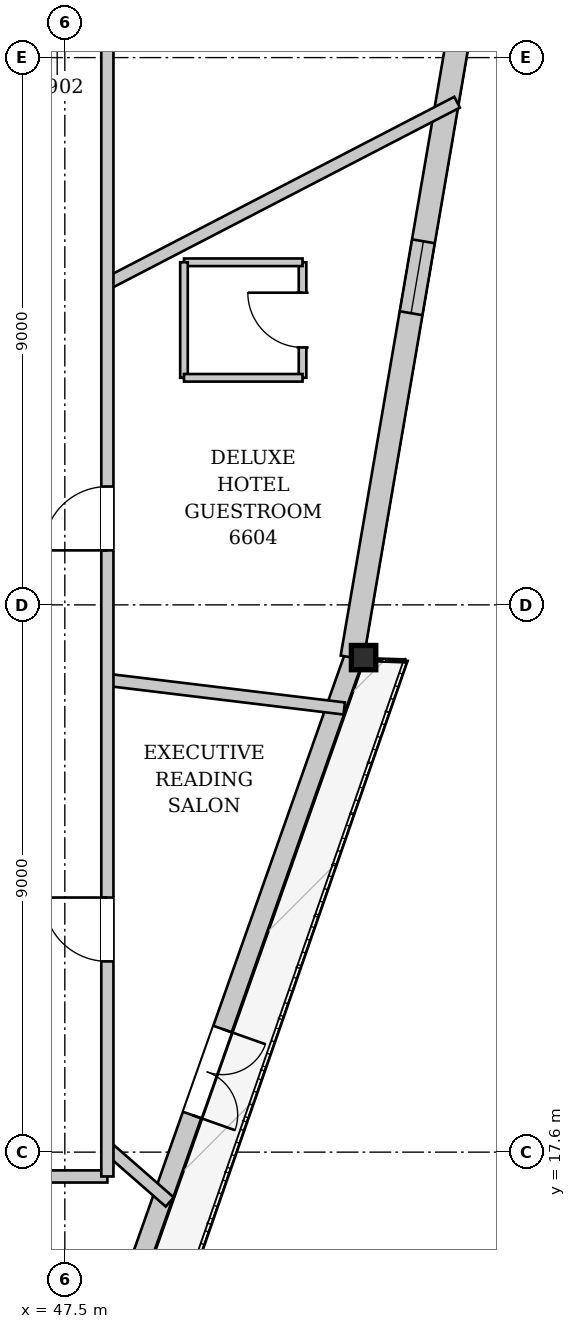
"""IFC4 building model, lengths in metres.
Left out: names, types, materials, properties, quantities, classifications, styles, units other than length and angle.
Written with IfcOpenShell. Run it as: python <this file> out.ifc"""

import sys

from ifc_helpers import new_model, si_unit, direction, frame, frame_2d, origin, origin_2d, place, context, subcontext, project, spatial, rectangle, i_section, extrude, source, transform, mapped, element, fill, save


model = new_model("IFC4")
c1 = context("Model", 3, precision=1e-05, world=origin(), true_north=direction((0.0, 1.0)))
c2 = subcontext(c1, "Body", "Model", "MODEL_VIEW")
j1 = project(units=[si_unit("LENGTHUNIT", "METRE"), si_unit("PLANEANGLEUNIT", "RADIAN")], contexts=[c1])
p1 = place(None, origin())
s1 = spatial("IfcSite", under=j1, at=p1, CompositionType="ELEMENT")
p2 = place(p1, origin())
s2 = spatial("IfcBuilding", under=s1, at=p2, CompositionType="ELEMENT")
p3 = place(p2, frame((0.0, 0.0, 248.9)))
s3 = spatial("IfcBuildingStorey", under=s2, at=p3, CompositionType="ELEMENT", Elevation=248.9)
m1 = source(origin(), c2, "Body", "SweptSolid", [
    extrude(i_section(OverallWidth=0.401, OverallDepth=0.399, WebThickness=0.022, FlangeThickness=0.034, at=origin_2d()), origin(), (0.0, 0.0, 1.0), 3.436),
])
p4 = place(p3, frame((52.412, 25.701, 0.0), z_axis=(0.001065918288, 0.018333794545, 0.999831353677), x_axis=(-0.998314169879, 0.058041521505, 0.0)))
e1 = element("IfcColumn", 1, at=p4, inside=s3, PredefinedType="COLUMN", context=c2, shape_type="MappedRepresentation", body=[
    mapped(m1, transform((0.0, 0.0, 0.0), x_axis=(1.0, 0.0, 0.0), y_axis=(0.0, 1.0, 0.0), z_axis=(0.0, 0.0, 1.0), scale=1.0)),
])
p5 = place(p3, frame((52.261, 25.755, 0.0), z_axis=(0.0, 0.0, 1.0), x_axis=(-0.333397626213, -0.94278630815, 0.0)))
e2 = element("IfcWall", 2, at=p5, inside=s3, PredefinedType="SOLIDWALL", context=c2, shape_type="SweptSolid", body=[
    extrude(rectangle(XDim=22.663, YDim=0.32, at=frame_2d((11.332, 0.0))), origin(), (0.0, 0.0, 1.0), 2.872),
])
p6 = place(p5, frame((6.502, 0.0, 0.0)))
e3 = element("IfcOpeningElement", 3, at=p6, cuts=e2, PredefinedType="OPENING", context=c2, shape_type="SweptSolid", body=[
    extrude(rectangle(XDim=1.5, YDim=2.3, at=frame_2d((0.75, 1.15))), frame((0.0, 0.17, 0.0), z_axis=(0.0, -1.0, 0.0), x_axis=(1.0, 0.0, 0.0)), (0.0, 0.0, 1.0), 0.34),
])
p7 = place(p5, frame((15.471, 0.0, 0.402)))
e4 = element("IfcOpeningElement", 4, at=p7, cuts=e2, PredefinedType="OPENING", context=c2, shape_type="SweptSolid", body=[
    extrude(rectangle(XDim=2.6, YDim=2.35, at=frame_2d((1.3, 1.175))), frame((0.0, 0.17, 0.0), z_axis=(0.0, -1.0, 0.0), x_axis=(1.0, 0.0, 0.0)), (0.0, 0.0, 1.0), 0.34),
])
p8 = place(p3, frame((56.053, 48.071, 0.0), z_axis=(0.0, 0.0, 1.0), x_axis=(-0.168923450159, -0.985629173668, 0.0)))
e5 = element("IfcWall", 5, at=p8, inside=s3, PredefinedType="SOLIDWALL", context=c2, shape_type="SweptSolid", body=[
    extrude(rectangle(XDim=22.663, YDim=0.38, at=frame_2d((11.332, 0.0))), origin(), (0.0, 0.0, 1.0), 2.872),
])
p9 = place(p8, frame((5.746, 0.0, 0.65)))
e6 = element("IfcOpeningElement", 6, at=p9, cuts=e5, PredefinedType="OPENING", context=c2, shape_type="SweptSolid", body=[
    extrude(rectangle(XDim=1.2, YDim=1.5, at=frame_2d((0.6, 0.75))), frame((0.0, 0.2, 0.0), z_axis=(0.0, -1.0, 0.0), x_axis=(1.0, 0.0, 0.0)), (0.0, 0.0, 1.0), 0.4),
])
p10 = place(p8, frame((15.718, 0.0, 0.65)))
e7 = element("IfcOpeningElement", 7, at=p10, cuts=e5, PredefinedType="OPENING", context=c2, shape_type="SweptSolid", body=[
    extrude(rectangle(XDim=1.2, YDim=1.5, at=frame_2d((0.6, 0.75))), frame((0.0, 0.2, 0.0), z_axis=(0.0, -1.0, 0.0), x_axis=(1.0, 0.0, 0.0)), (0.0, 0.0, 1.0), 0.4),
])
p11 = place(p3, frame((48.2, 17.677, 0.0), z_axis=(0.0, 0.0, 1.0), x_axis=(0.752676622661, -0.658390387005, 0.0)))
e8 = element("IfcWall", 8, at=p11, inside=s3, PredefinedType="PARTITIONING", context=c2, shape_type="SweptSolid", body=[
    extrude(rectangle(XDim=1.362, YDim=0.2, at=frame_2d((0.681, 0.0))), origin(), (0.0, 0.0, 1.0), 3.38),
])
p12 = place(p3, frame((48.2, 25.367, 0.0), z_axis=(0.0, 0.0, 1.0), x_axis=(0.992770450303, -0.120028467479, 0.0)))
e9 = element("IfcWall", 9, at=p12, inside=s3, PredefinedType="PARTITIONING", context=c2, shape_type="SweptSolid", body=[
    extrude(rectangle(XDim=3.924, YDim=0.2, at=frame_2d((1.962, 0.0))), origin(), (0.0, 0.0, 1.0), 3.38),
])
p13 = place(p3, frame((48.2, 31.885, 0.0), z_axis=(0.0, 0.0, 1.0), x_axis=(0.887874845761, 0.460085055468, 0.0)))
e10 = element("IfcWall", 10, at=p13, inside=s3, PredefinedType="PARTITIONING", context=c2, shape_type="SweptSolid", body=[
    extrude(rectangle(XDim=6.479, YDim=0.2, at=frame_2d((3.239, 0.0))), origin(), (0.0, 0.0, 1.0), 3.38),
])
p14 = place(p3, frame((42.069, 34.15, 0.0), z_axis=(0.0, 0.0, 1.0), x_axis=(0.474411767959, 0.880303058283, 0.0)))
e11 = element("IfcWall", 11, at=p14, inside=s3, PredefinedType="PARTITIONING", context=c2, shape_type="SweptSolid", body=[
    extrude(rectangle(XDim=14.84, YDim=0.2, at=frame_2d((7.42, 0.0))), origin(), (0.0, 0.0, 1.0), 3.38),
])
p15 = place(p3, frame((51.41, 30.334, 0.0), z_axis=(0.0, 0.0, 1.0), x_axis=(0.0, 1.0, 0.0)))
e12 = element("IfcWall", 12, at=p15, inside=s3, PredefinedType="PARTITIONING", context=c2, shape_type="SweptSolid", body=[
    extrude(rectangle(XDim=1.9, YDim=0.125, at=frame_2d((0.95, 0.0))), origin(), (0.0, 0.0, 1.0), 3.38),
])
p16 = place(p15, frame((0.5, 0.0, 0.0)))
e13 = element("IfcOpeningElement", 13, at=p16, cuts=e12, PredefinedType="OPENING", context=c2, shape_type="SweptSolid", body=[
    extrude(rectangle(XDim=0.9, YDim=2.1, at=frame_2d((0.45, 1.05))), frame((0.0, 0.073, 0.0), z_axis=(0.0, -1.0, 0.0), x_axis=(1.0, 0.0, 0.0)), (0.0, 0.0, 1.0), 0.145),
])
p17 = place(p3, frame((51.41, 32.234, 0.0), z_axis=(0.0, 0.0, 1.0), x_axis=(-1.0, 0.0, 0.0)))
e14 = element("IfcWall", 14, at=p17, inside=s3, PredefinedType="PARTITIONING", context=c2, shape_type="SweptSolid", body=[
    extrude(rectangle(XDim=1.95, YDim=0.125, at=frame_2d((0.975, 0.0))), origin(), (0.0, 0.0, 1.0), 3.38),
])
p18 = place(p3, frame((49.46, 32.234, 0.0), z_axis=(0.0, 0.0, 1.0), x_axis=(0.0, -1.0, 0.0)))
e15 = element("IfcWall", 15, at=p18, inside=s3, PredefinedType="PARTITIONING", context=c2, shape_type="SweptSolid", body=[
    extrude(rectangle(XDim=1.9, YDim=0.125, at=frame_2d((0.95, 0.0))), origin(), (0.0, 0.0, 1.0), 3.38),
])
p19 = place(p3, frame((49.46, 30.334, 0.0), z_axis=(0.0, 0.0, 1.0), x_axis=(1.0, 0.0, 0.0)))
e16 = element("IfcWall", 16, at=p19, inside=s3, PredefinedType="PARTITIONING", context=c2, shape_type="SweptSolid", body=[
    extrude(rectangle(XDim=1.95, YDim=0.125, at=frame_2d((0.975, 0.0))), origin(), (0.0, 0.0, 1.0), 3.38),
])
p20 = place(p3, frame((27.8, 17.2, 0.0), z_axis=(0.0, 0.0, 1.0), x_axis=(1.0, 0.0, 0.0)))
e17 = element("IfcWall", 17, at=p20, inside=s3, PredefinedType="PARTITIONING", context=c2, shape_type="SweptSolid", body=[
    extrude(rectangle(XDim=20.4, YDim=0.2, at=frame_2d((10.2, 0.0))), origin(), (0.0, 0.0, 1.0), 3.38),
])
p21 = place(p20, frame((9.291, 0.0, 0.0)))
e18 = element("IfcOpeningElement", 18, at=p21, cuts=e17, PredefinedType="OPENING", context=c2, shape_type="SweptSolid", body=[
    extrude(rectangle(XDim=1.05, YDim=2.2, at=frame_2d((0.525, 1.1))), frame((0.0, 0.11, 0.0), z_axis=(0.0, -1.0, 0.0), x_axis=(1.0, 0.0, 0.0)), (0.0, 0.0, 1.0), 0.22),
])
p22 = place(p20, frame((17.616, 0.0, 0.0)))
e19 = element("IfcOpeningElement", 19, at=p22, cuts=e17, PredefinedType="OPENING", context=c2, shape_type="SweptSolid", body=[
    extrude(rectangle(XDim=1.05, YDim=2.2, at=frame_2d((0.525, 1.1))), frame((0.0, 0.11, 0.0), z_axis=(0.0, -1.0, 0.0), x_axis=(1.0, 0.0, 0.0)), (0.0, 0.0, 1.0), 0.22),
])
p23 = place(p20, frame((0.361, 0.0, 0.0)))
e20 = element("IfcOpeningElement", 20, at=p23, cuts=e17, PredefinedType="OPENING", context=c2, shape_type="SweptSolid", body=[
    extrude(rectangle(XDim=1.05, YDim=2.2, at=frame_2d((0.525, 1.1))), frame((0.0, 0.11, 0.0), z_axis=(0.0, -1.0, 0.0), x_axis=(1.0, 0.0, 0.0)), (0.0, 0.0, 1.0), 0.22),
])
p24 = place(p3, frame((48.2, 17.2, 0.0), z_axis=(0.0, 0.0, 1.0), x_axis=(0.0, 1.0, 0.0)))
e21 = element("IfcWall", 21, at=p24, inside=s3, PredefinedType="PARTITIONING", context=c2, shape_type="SweptSolid", body=[
    extrude(rectangle(XDim=18.8, YDim=0.2, at=frame_2d((9.4, 0.0))), origin(), (0.0, 0.0, 1.0), 3.065),
])
p25 = place(p24, frame((3.537, 0.0, 0.0)))
e22 = element("IfcOpeningElement", 22, at=p25, cuts=e21, PredefinedType="OPENING", context=c2, shape_type="SweptSolid", body=[
    extrude(rectangle(XDim=1.05, YDim=2.2, at=frame_2d((0.525, 1.1))), frame((0.0, 0.11, 0.0), z_axis=(0.0, -1.0, 0.0), x_axis=(1.0, 0.0, 0.0)), (0.0, 0.0, 1.0), 0.22),
])
p26 = place(p24, frame((10.296, 0.0, 0.0)))
e23 = element("IfcOpeningElement", 23, at=p26, cuts=e21, PredefinedType="OPENING", context=c2, shape_type="SweptSolid", body=[
    extrude(rectangle(XDim=1.05, YDim=2.2, at=frame_2d((0.525, 1.1))), frame((0.0, 0.11, 0.0), z_axis=(0.0, -1.0, 0.0), x_axis=(1.0, 0.0, 0.0)), (0.0, 0.0, 1.0), 0.22),
])
m2 = source(origin(), c2, "Body", "SweptSolid", [
    extrude(rectangle(XDim=1.5, YDim=2.3, at=frame_2d((0.75, 1.15))), frame((0.0, 0.025, 0.0), z_axis=(0.0, -1.0, 0.0), x_axis=(1.0, 0.0, 0.0)), (0.0, 0.0, 1.0), 0.05),
])
p27 = place(p6, origin())
e24 = element("IfcDoor", 24, at=p27, inside=s3, OperationType="DOUBLE_DOOR_SINGLE_SWING", PredefinedType="DOOR", context=c2, shape_type="MappedRepresentation", body=[
    mapped(m2, transform((0.0, 0.0, 0.0), x_axis=(1.0, 0.0, 0.0), y_axis=(0.0, 1.0, 0.0), z_axis=(0.0, 0.0, 1.0), scale=1.0)),
])
fill(e3, e24)
m3 = source(origin(), c2, "Body", "SweptSolid", [
    extrude(rectangle(XDim=1.2, YDim=1.5, at=frame_2d((0.6, 0.75))), frame((0.0, 0.03, 0.0), z_axis=(0.0, -1.0, 0.0), x_axis=(1.0, 0.0, 0.0)), (0.0, 0.0, 1.0), 0.06),
])
p28 = place(p10, origin())
e25 = element("IfcWindow", 25, at=p28, inside=s3, PartitioningType="SINGLE_PANEL", PredefinedType="WINDOW", context=c2, shape_type="MappedRepresentation", body=[
    mapped(m3, transform((0.0, 0.0, 0.0), x_axis=(1.0, 0.0, 0.0), y_axis=(0.0, 1.0, 0.0), z_axis=(0.0, 0.0, 1.0), scale=1.0)),
])
fill(e7, e25)
m4 = source(origin(), c2, "Body", "SweptSolid", [
    extrude(rectangle(XDim=0.9, YDim=2.1, at=frame_2d((0.45, 1.05))), frame((0.0, 0.025, 0.0), z_axis=(0.0, -1.0, 0.0), x_axis=(1.0, 0.0, 0.0)), (0.0, 0.0, 1.0), 0.05),
])
p29 = place(p16, origin())
e26 = element("IfcDoor", 26, at=p29, inside=s3, OperationType="SINGLE_SWING_RIGHT", PredefinedType="DOOR", context=c2, shape_type="MappedRepresentation", body=[
    mapped(m4, transform((0.0, 0.0, 0.0), x_axis=(1.0, 0.0, 0.0), y_axis=(0.0, 1.0, 0.0), z_axis=(0.0, 0.0, 1.0), scale=1.0)),
])
fill(e13, e26)
m5 = source(origin(), c2, "Body", "SweptSolid", [
    extrude(rectangle(XDim=1.05, YDim=2.2, at=frame_2d((0.525, 1.1))), frame((0.0, 0.025, 0.0), z_axis=(0.0, -1.0, 0.0), x_axis=(1.0, 0.0, 0.0)), (0.0, 0.0, 1.0), 0.05),
])
p30 = place(p25, origin())
e27 = element("IfcDoor", 27, at=p30, inside=s3, OperationType="SINGLE_SWING_RIGHT", PredefinedType="DOOR", context=c2, shape_type="MappedRepresentation", body=[
    mapped(m5, transform((0.0, 0.0, 0.0), x_axis=(1.0, 0.0, 0.0), y_axis=(0.0, 1.0, 0.0), z_axis=(0.0, 0.0, 1.0), scale=1.0)),
])
fill(e22, e27)
p31 = place(p26, origin())
e28 = element("IfcDoor", 28, at=p31, inside=s3, OperationType="SINGLE_SWING_LEFT", PredefinedType="DOOR", context=c2, shape_type="MappedRepresentation", body=[
    mapped(m5, transform((0.0, 0.0, 0.0), x_axis=(1.0, 0.0, 0.0), y_axis=(0.0, 1.0, 0.0), z_axis=(0.0, 0.0, 1.0), scale=1.0)),
])
fill(e23, e28)
save(model, sys.argv[1])
